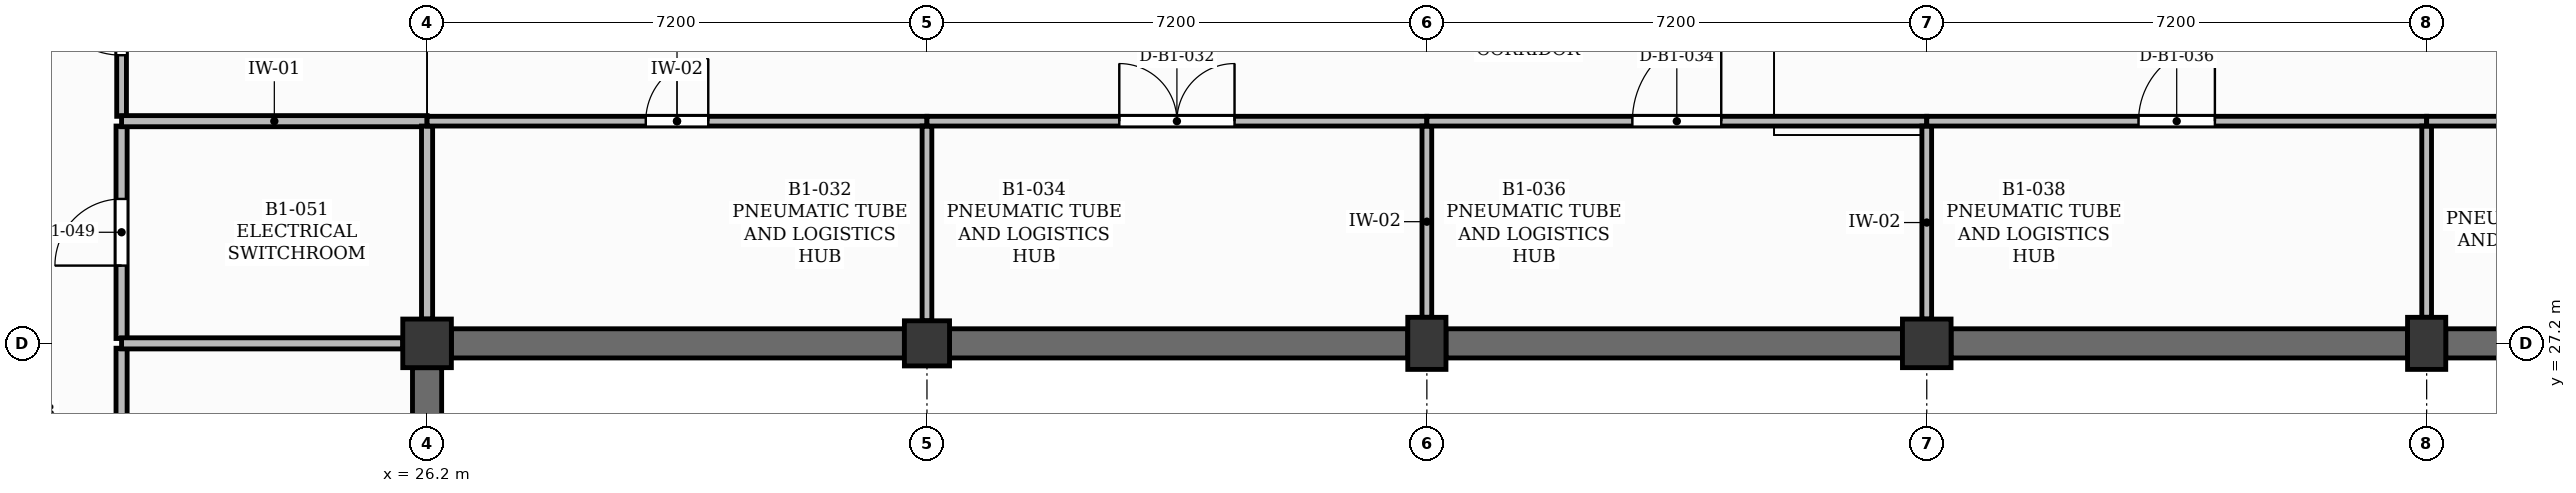
"""IFC4 building model, lengths in metres.
Left out: names, types, materials, properties, quantities, classifications, styles, units other than length and angle.
Written with IfcOpenShell. Run it as: python <this file> out.ifc"""

import sys

from ifc_helpers import new_model, si_unit, direction, frame, frame_2d, origin, origin_2d, place, context, subcontext, project, spatial, rectangle, extrude, element, fill, save


model = new_model("IFC4")
c1 = context("Model", 3, precision=1e-05, world=origin(), true_north=direction((0.0, 1.0)))
c2 = subcontext(c1, "Body", "Model", "MODEL_VIEW")
j1 = project(units=[si_unit("LENGTHUNIT", "METRE"), si_unit("PLANEANGLEUNIT", "RADIAN")], contexts=[c1])
p1 = place(None, origin())
s1 = spatial("IfcSite", under=j1, at=p1, CompositionType="ELEMENT")
p2 = place(p1, origin())
s2 = spatial("IfcBuilding", under=s1, at=p2, CompositionType="ELEMENT")
p3 = place(p2, frame((0.0, 0.0, -4.5)))
s3 = spatial("IfcBuildingStorey", under=s2, at=p3, CompositionType="ELEMENT", Elevation=-4.5)
p4 = place(p3, frame((26.2, 27.2, 0.0), z_axis=(0.0, 0.0, 1.0), x_axis=(1.0, 0.0, 0.0)))
e1 = element("IfcColumn", 1, at=p4, inside=s3, PredefinedType="COLUMN", context=c2, shape_type="SweptSolid", body=[
    extrude(rectangle(XDim=0.7, YDim=0.7, at=origin_2d()), origin(), (0.0, 0.0, 1.0), 4.2),
])
p5 = place(p3, frame((33.4, 27.2, 0.0), z_axis=(0.0, 0.0, 1.0), x_axis=(1.0, 0.0, 0.0)))
e2 = element("IfcColumn", 2, at=p5, inside=s3, PredefinedType="COLUMN", context=c2, shape_type="SweptSolid", body=[
    extrude(rectangle(XDim=0.65, YDim=0.65, at=origin_2d()), origin(), (0.0, 0.0, 1.0), 4.2),
])
p6 = place(p3, frame((40.6, 27.2, 0.0), z_axis=(0.0, 0.0, 1.0), x_axis=(1.0, 0.0, 0.0)))
e3 = element("IfcColumn", 3, at=p6, inside=s3, PredefinedType="COLUMN", context=c2, shape_type="SweptSolid", body=[
    extrude(rectangle(XDim=0.55, YDim=0.75, at=origin_2d()), origin(), (0.0, 0.0, 1.0), 4.2),
])
p7 = place(p3, frame((47.8, 27.2, 0.0), z_axis=(0.0, 0.0, 1.0), x_axis=(1.0, 0.0, 0.0)))
e4 = element("IfcColumn", 4, at=p7, inside=s3, PredefinedType="COLUMN", context=c2, shape_type="SweptSolid", body=[
    extrude(rectangle(XDim=0.7, YDim=0.7, at=origin_2d()), origin(), (0.0, 0.0, 1.0), 4.2),
])
p8 = place(p3, frame((55.0, 27.2, 0.0), z_axis=(0.0, 0.0, 1.0), x_axis=(1.0, 0.0, 0.0)))
e5 = element("IfcColumn", 5, at=p8, inside=s3, PredefinedType="COLUMN", context=c2, shape_type="SweptSolid", body=[
    extrude(rectangle(XDim=0.55, YDim=0.75, at=origin_2d()), origin(), (0.0, 0.0, 1.0), 4.2),
])
p9 = place(p3, frame((26.2, 18.975, 0.0), z_axis=(0.0, 0.0, 1.0), x_axis=(0.0, 1.0, 0.0)))
e6 = element("IfcWall", 6, at=p9, inside=s3, PredefinedType="USERDEFINED", context=c2, shape_type="SweptSolid", body=[
    extrude(rectangle(XDim=7.875, YDim=0.42, at=frame_2d((3.938, 0.0))), origin(), (0.0, 0.0, 1.0), 4.2),
])
p10 = place(p3, frame((26.55, 27.2, 0.0), z_axis=(0.0, 0.0, 1.0), x_axis=(1.0, 0.0, 0.0)))
e7 = element("IfcWall", 7, at=p10, inside=s3, PredefinedType="USERDEFINED", context=c2, shape_type="SweptSolid", body=[
    extrude(rectangle(XDim=6.525, YDim=0.42, at=frame_2d((3.262, 0.0))), origin(), (0.0, 0.0, 1.0), 4.2),
])
p11 = place(p3, frame((33.725, 27.2, 0.0), z_axis=(0.0, 0.0, 1.0), x_axis=(1.0, 0.0, 0.0)))
e8 = element("IfcWall", 8, at=p11, inside=s3, PredefinedType="USERDEFINED", context=c2, shape_type="SweptSolid", body=[
    extrude(rectangle(XDim=6.6, YDim=0.42, at=frame_2d((3.3, 0.0))), origin(), (0.0, 0.0, 1.0), 4.2),
])
p12 = place(p3, frame((40.875, 27.2, 0.0), z_axis=(0.0, 0.0, 1.0), x_axis=(1.0, 0.0, 0.0)))
e9 = element("IfcWall", 9, at=p12, inside=s3, PredefinedType="USERDEFINED", context=c2, shape_type="SweptSolid", body=[
    extrude(rectangle(XDim=6.575, YDim=0.42, at=frame_2d((3.288, 0.0))), origin(), (0.0, 0.0, 1.0), 4.2),
])
p13 = place(p3, frame((48.15, 27.2, 0.0), z_axis=(0.0, 0.0, 1.0), x_axis=(1.0, 0.0, 0.0)))
e10 = element("IfcWall", 10, at=p13, inside=s3, PredefinedType="USERDEFINED", context=c2, shape_type="SweptSolid", body=[
    extrude(rectangle(XDim=6.575, YDim=0.42, at=frame_2d((3.288, 0.0))), origin(), (0.0, 0.0, 1.0), 4.2),
])
p14 = place(p3, frame((55.275, 27.2, 0.0), z_axis=(0.0, 0.0, 1.0), x_axis=(1.0, 0.0, 0.0)))
e11 = element("IfcWall", 11, at=p14, inside=s3, PredefinedType="USERDEFINED", context=c2, shape_type="SweptSolid", body=[
    extrude(rectangle(XDim=6.6, YDim=0.42, at=frame_2d((3.3, 0.0))), origin(), (0.0, 0.0, 1.0), 4.2),
])
p15 = place(p3, frame((21.8, 18.67, 0.0), z_axis=(0.0, 0.0, 1.0), x_axis=(0.0, 1.0, 0.0)))
e12 = element("IfcWall", 12, at=p15, inside=s3, PredefinedType="PARTITIONING", context=c2, shape_type="SweptSolid", body=[
    extrude(rectangle(XDim=8.46, YDim=0.16, at=frame_2d((4.23, 0.0))), origin(), (0.0, 0.0, 1.0), 4.08),
])
p16 = place(p15, frame((3.75, 0.0, 0.0)))
e13 = element("IfcOpeningElement", 13, at=p16, cuts=e12, PredefinedType="OPENING", context=c2, shape_type="SweptSolid", body=[
    extrude(rectangle(XDim=0.96, YDim=2.1, at=frame_2d((0.48, 1.05))), frame((0.0, 0.09, 0.0), z_axis=(0.0, -1.0, 0.0), x_axis=(1.0, 0.0, 0.0)), (0.0, 0.0, 1.0), 0.18),
])
p17 = place(p3, frame((21.8, 27.27, 0.0), z_axis=(0.0, 0.0, 1.0), x_axis=(0.0, 1.0, 0.0)))
e14 = element("IfcWall", 14, at=p17, inside=s3, PredefinedType="PARTITIONING", context=c2, shape_type="SweptSolid", body=[
    extrude(rectangle(XDim=3.06, YDim=0.16, at=frame_2d((1.53, 0.0))), origin(), (0.0, 0.0, 1.0), 4.08),
])
p18 = place(p17, frame((1.05, 0.0, 0.0)))
e15 = element("IfcOpeningElement", 15, at=p18, cuts=e14, PredefinedType="OPENING", context=c2, shape_type="SweptSolid", body=[
    extrude(rectangle(XDim=0.96, YDim=2.1, at=frame_2d((0.48, 1.05))), frame((0.0, 0.09, 0.0), z_axis=(0.0, -1.0, 0.0), x_axis=(1.0, 0.0, 0.0)), (0.0, 0.0, 1.0), 0.18),
])
p19 = place(p3, frame((21.8, 27.2, 0.0), z_axis=(0.0, 0.0, 1.0), x_axis=(1.0, 0.0, 0.0)))
e16 = element("IfcWall", 16, at=p19, inside=s3, PredefinedType="PARTITIONING", context=c2, shape_type="SweptSolid", body=[
    extrude(rectangle(XDim=4.05, YDim=0.16, at=frame_2d((2.025, 0.0))), origin(), (0.0, 0.0, 1.0), 3.6),
])
p20 = place(p3, frame((21.8, 30.47, 0.0), z_axis=(0.0, 0.0, 1.0), x_axis=(0.0, 1.0, 0.0)))
e17 = element("IfcWall", 17, at=p20, inside=s3, PredefinedType="PARTITIONING", context=c2, shape_type="SweptSolid", body=[
    extrude(rectangle(XDim=2.86, YDim=0.14, at=frame_2d((1.43, 0.0))), origin(), (0.0, 0.0, 1.0), 4.08),
])
p21 = place(p20, frame((0.88, 0.0, 0.0)))
e18 = element("IfcOpeningElement", 18, at=p21, cuts=e17, PredefinedType="OPENING", context=c2, shape_type="SweptSolid", body=[
    extrude(rectangle(XDim=1.1, YDim=2.1, at=frame_2d((0.55, 1.05))), frame((0.0, 0.08, 0.0), z_axis=(0.0, -1.0, 0.0), x_axis=(1.0, 0.0, 0.0)), (0.0, 0.0, 1.0), 0.16),
])
p22 = place(p3, frame((21.8, 30.4, 0.0), z_axis=(0.0, 0.0, 1.0), x_axis=(1.0, 0.0, 0.0)))
e19 = element("IfcWall", 19, at=p22, inside=s3, PredefinedType="PARTITIONING", context=c2, shape_type="SweptSolid", body=[
    extrude(rectangle(XDim=4.4, YDim=0.16, at=frame_2d((2.2, 0.0))), origin(), (0.0, 0.0, 1.0), 4.08),
])
p23 = place(p3, frame((26.2, 27.55, 0.0), z_axis=(0.0, 0.0, 1.0), x_axis=(0.0, 1.0, 0.0)))
e20 = element("IfcWall", 20, at=p23, inside=s3, PredefinedType="PARTITIONING", context=c2, shape_type="SweptSolid", body=[
    extrude(rectangle(XDim=2.78, YDim=0.16, at=frame_2d((1.39, 0.0))), origin(), (0.0, 0.0, 1.0), 3.4),
])
p24 = place(p3, frame((26.2, 30.4, 0.0), z_axis=(0.0, 0.0, 1.0), x_axis=(1.0, 0.0, 0.0)))
e21 = element("IfcWall", 21, at=p24, inside=s3, PredefinedType="PARTITIONING", context=c2, shape_type="SweptSolid", body=[
    extrude(rectangle(XDim=7.2, YDim=0.14, at=frame_2d((3.6, 0.0))), origin(), (0.0, 0.0, 1.0), 4.08),
])
p25 = place(p24, frame((3.15, 0.0, 0.0)))
e22 = element("IfcOpeningElement", 22, at=p25, cuts=e21, PredefinedType="OPENING", context=c2, shape_type="SweptSolid", body=[
    extrude(rectangle(XDim=0.9, YDim=2.1, at=frame_2d((0.45, 1.05))), frame((0.0, 0.08, 0.0), z_axis=(0.0, -1.0, 0.0), x_axis=(1.0, 0.0, 0.0)), (0.0, 0.0, 1.0), 0.16),
])
p26 = place(p3, frame((33.4, 27.525, 0.0), z_axis=(0.0, 0.0, 1.0), x_axis=(0.0, 1.0, 0.0)))
e23 = element("IfcWall", 23, at=p26, inside=s3, PredefinedType="PARTITIONING", context=c2, shape_type="SweptSolid", body=[
    extrude(rectangle(XDim=2.805, YDim=0.14, at=frame_2d((1.403, 0.0))), origin(), (0.0, 0.0, 1.0), 3.4),
])
p27 = place(p3, frame((33.4, 30.4, 0.0), z_axis=(0.0, 0.0, 1.0), x_axis=(1.0, 0.0, 0.0)))
e24 = element("IfcWall", 24, at=p27, inside=s3, PredefinedType="PARTITIONING", context=c2, shape_type="SweptSolid", body=[
    extrude(rectangle(XDim=7.2, YDim=0.14, at=frame_2d((3.6, 0.0))), origin(), (0.0, 0.0, 1.0), 4.08),
])
p28 = place(p27, frame((2.77, 0.0, 0.0)))
e25 = element("IfcOpeningElement", 25, at=p28, cuts=e24, PredefinedType="OPENING", context=c2, shape_type="SweptSolid", body=[
    extrude(rectangle(XDim=1.66, YDim=2.3, at=frame_2d((0.83, 1.15))), frame((0.0, 0.08, 0.0), z_axis=(0.0, -1.0, 0.0), x_axis=(1.0, 0.0, 0.0)), (0.0, 0.0, 1.0), 0.16),
])
p29 = place(p3, frame((40.6, 27.575, 0.0), z_axis=(0.0, 0.0, 1.0), x_axis=(0.0, 1.0, 0.0)))
e26 = element("IfcWall", 26, at=p29, inside=s3, PredefinedType="PARTITIONING", context=c2, shape_type="SweptSolid", body=[
    extrude(rectangle(XDim=2.755, YDim=0.14, at=frame_2d((1.377, 0.0))), origin(), (0.0, 0.0, 1.0), 3.4),
])
p30 = place(p3, frame((40.6, 30.4, 0.0), z_axis=(0.0, 0.0, 1.0), x_axis=(1.0, 0.0, 0.0)))
e27 = element("IfcWall", 27, at=p30, inside=s3, PredefinedType="PARTITIONING", context=c2, shape_type="SweptSolid", body=[
    extrude(rectangle(XDim=7.2, YDim=0.14, at=frame_2d((3.6, 0.0))), origin(), (0.0, 0.0, 1.0), 4.08),
])
p31 = place(p30, frame((2.96, 0.0, 0.0)))
e28 = element("IfcOpeningElement", 28, at=p31, cuts=e27, PredefinedType="OPENING", context=c2, shape_type="SweptSolid", body=[
    extrude(rectangle(XDim=1.28, YDim=2.2, at=frame_2d((0.64, 1.1))), frame((0.0, 0.08, 0.0), z_axis=(0.0, -1.0, 0.0), x_axis=(1.0, 0.0, 0.0)), (0.0, 0.0, 1.0), 0.16),
])
p32 = place(p3, frame((47.8, 27.55, 0.0), z_axis=(0.0, 0.0, 1.0), x_axis=(0.0, 1.0, 0.0)))
e29 = element("IfcWall", 29, at=p32, inside=s3, PredefinedType="PARTITIONING", context=c2, shape_type="SweptSolid", body=[
    extrude(rectangle(XDim=2.78, YDim=0.14, at=frame_2d((1.39, 0.0))), origin(), (0.0, 0.0, 1.0), 3.4),
])
p33 = place(p3, frame((47.8, 30.4, 0.0), z_axis=(0.0, 0.0, 1.0), x_axis=(1.0, 0.0, 0.0)))
e30 = element("IfcWall", 30, at=p33, inside=s3, PredefinedType="PARTITIONING", context=c2, shape_type="SweptSolid", body=[
    extrude(rectangle(XDim=7.2, YDim=0.14, at=frame_2d((3.6, 0.0))), origin(), (0.0, 0.0, 1.0), 4.08),
])
p34 = place(p33, frame((3.05, 0.0, 0.0)))
e31 = element("IfcOpeningElement", 31, at=p34, cuts=e30, PredefinedType="OPENING", context=c2, shape_type="SweptSolid", body=[
    extrude(rectangle(XDim=1.1, YDim=2.1, at=frame_2d((0.55, 1.05))), frame((0.0, 0.08, 0.0), z_axis=(0.0, -1.0, 0.0), x_axis=(1.0, 0.0, 0.0)), (0.0, 0.0, 1.0), 0.16),
])
p35 = place(p3, frame((55.0, 27.575, 0.0), z_axis=(0.0, 0.0, 1.0), x_axis=(0.0, 1.0, 0.0)))
e32 = element("IfcWall", 32, at=p35, inside=s3, PredefinedType="PARTITIONING", context=c2, shape_type="SweptSolid", body=[
    extrude(rectangle(XDim=2.755, YDim=0.14, at=frame_2d((1.377, 0.0))), origin(), (0.0, 0.0, 1.0), 3.4),
])
p36 = place(p3, frame((55.0, 30.4, 0.0), z_axis=(0.0, 0.0, 1.0), x_axis=(1.0, 0.0, 0.0)))
e33 = element("IfcWall", 33, at=p36, inside=s3, PredefinedType="PARTITIONING", context=c2, shape_type="SweptSolid", body=[
    extrude(rectangle(XDim=7.05, YDim=0.14, at=frame_2d((3.525, 0.0))), origin(), (0.0, 0.0, 1.0), 4.08),
])
p37 = place(p36, frame((3.075, 0.0, 0.0)))
e34 = element("IfcOpeningElement", 34, at=p37, cuts=e33, PredefinedType="OPENING", context=c2, shape_type="SweptSolid", body=[
    extrude(rectangle(XDim=0.9, YDim=2.1, at=frame_2d((0.45, 1.05))), frame((0.0, 0.08, 0.0), z_axis=(0.0, -1.0, 0.0), x_axis=(1.0, 0.0, 0.0)), (0.0, 0.0, 1.0), 0.16),
])
p38 = place(p21, origin())
e35 = element("IfcDoor", 35, at=p38, inside=s3, OperationType="SINGLE_SWING_RIGHT", PredefinedType="DOOR", context=c2, shape_type="SweptSolid", body=[
    extrude(rectangle(XDim=1.1, YDim=2.1, at=frame_2d((0.55, 1.05))), frame((0.0, 0.025, 0.0), z_axis=(0.0, -1.0, 0.0), x_axis=(1.0, 0.0, 0.0)), (0.0, 0.0, 1.0), 0.05),
])
fill(e18, e35)
p39 = place(p25, origin())
e36 = element("IfcDoor", 36, at=p39, inside=s3, OperationType="SINGLE_SWING_RIGHT", PredefinedType="DOOR", context=c2, shape_type="SweptSolid", body=[
    extrude(rectangle(XDim=0.9, YDim=2.1, at=frame_2d((0.45, 1.05))), frame((0.0, 0.025, 0.0), z_axis=(0.0, -1.0, 0.0), x_axis=(1.0, 0.0, 0.0)), (0.0, 0.0, 1.0), 0.05),
])
fill(e22, e36)
p40 = place(p28, origin())
e37 = element("IfcDoor", 37, at=p40, inside=s3, OperationType="DOUBLE_DOOR_SINGLE_SWING", PredefinedType="DOOR", context=c2, shape_type="SweptSolid", body=[
    extrude(rectangle(XDim=1.66, YDim=2.3, at=frame_2d((0.83, 1.15))), frame((0.0, 0.025, 0.0), z_axis=(0.0, -1.0, 0.0), x_axis=(1.0, 0.0, 0.0)), (0.0, 0.0, 1.0), 0.05),
])
fill(e25, e37)
p41 = place(p31, origin())
e38 = element("IfcDoor", 38, at=p41, inside=s3, OperationType="SINGLE_SWING_RIGHT", PredefinedType="DOOR", context=c2, shape_type="SweptSolid", body=[
    extrude(rectangle(XDim=1.28, YDim=2.2, at=frame_2d((0.64, 1.1))), frame((0.0, 0.025, 0.0), z_axis=(0.0, -1.0, 0.0), x_axis=(1.0, 0.0, 0.0)), (0.0, 0.0, 1.0), 0.05),
])
fill(e28, e38)
p42 = place(p34, origin())
e39 = element("IfcDoor", 39, at=p42, inside=s3, OperationType="SINGLE_SWING_RIGHT", PredefinedType="DOOR", context=c2, shape_type="SweptSolid", body=[
    extrude(rectangle(XDim=1.1, YDim=2.1, at=frame_2d((0.55, 1.05))), frame((0.0, 0.025, 0.0), z_axis=(0.0, -1.0, 0.0), x_axis=(1.0, 0.0, 0.0)), (0.0, 0.0, 1.0), 0.05),
])
fill(e31, e39)
p43 = place(p18, origin())
e40 = element("IfcDoor", 40, at=p43, inside=s3, OperationType="SINGLE_SWING_LEFT", PredefinedType="DOOR", context=c2, shape_type="SweptSolid", body=[
    extrude(rectangle(XDim=0.96, YDim=2.1, at=frame_2d((0.48, 1.05))), frame((0.0, 0.025, 0.0), z_axis=(0.0, -1.0, 0.0), x_axis=(1.0, 0.0, 0.0)), (0.0, 0.0, 1.0), 0.05),
])
fill(e15, e40)
save(model, sys.argv[1])
